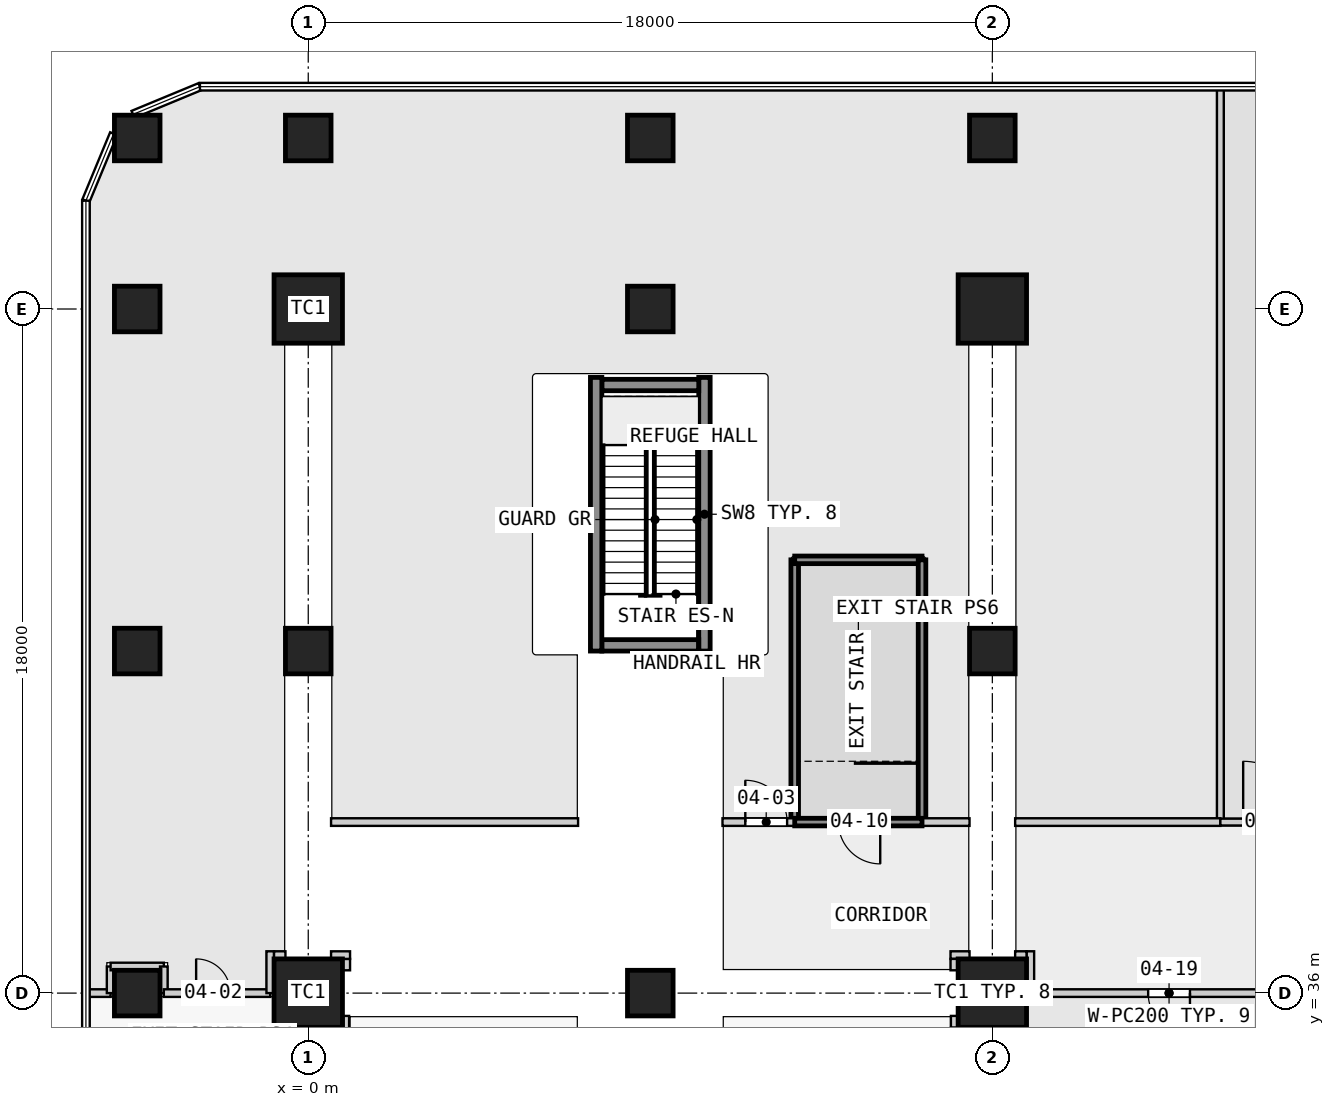
"""IFC4 building model, lengths in metres.
Left out: names, types, materials, properties, quantities, classifications, styles, units other than length and angle.
Written with IfcOpenShell. Run it as: python <this file> out.ifc"""

import sys

from ifc_helpers import new_model, si_unit, direction, frame, frame_2d, origin, origin_2d, place, context, subcontext, project, spatial, rectangle, extrude, element, fill, save


model = new_model("IFC4")
c1 = context("Model", 3, precision=1e-05, world=origin(), true_north=direction((0.0, 1.0)))
c2 = subcontext(c1, "Body", "Model", "MODEL_VIEW")
j1 = project(units=[si_unit("LENGTHUNIT", "METRE"), si_unit("PLANEANGLEUNIT", "RADIAN")], contexts=[c1])
p1 = place(None, origin())
s1 = spatial("IfcSite", under=j1, at=p1, CompositionType="ELEMENT")
p2 = place(p1, origin())
s2 = spatial("IfcBuilding", under=s1, at=p2, CompositionType="ELEMENT")
p3 = place(p2, frame((0.0, 0.0, 21.8)))
s3 = spatial("IfcBuildingStorey", under=s2, at=p3, CompositionType="ELEMENT", Elevation=21.8)
for number, where, z_axis, x_axis in (
    (1, (-4.5, 36.0, 0.0), (0.0, 0.0, 1.0), (1.0, 0.0, 0.0)),
    (2, (-4.5, 45.0, 0.0), (0.0, 0.0, 1.0), (1.0, 0.0, 0.0)),
    (3, (-4.5, 54.0, 0.0), (0.0, 0.0, 1.0), (1.0, 0.0, 0.0)),
    (4, (-4.5, 58.5, 0.0), (0.0, 0.0, 1.0), (1.0, 0.0, 0.0)),
):
    element("IfcColumn", number, at=place(p3, frame(where, z_axis=z_axis, x_axis=x_axis)), inside=s3, PredefinedType="COLUMN", context=c2, shape_type="SweptSolid", body=[
        extrude(rectangle(XDim=1.2, YDim=1.2, at=origin_2d()), origin(), (0.0, 0.0, 1.0), 5.0),
    ])
p4 = place(p3, frame((0.0, 36.0, 0.0), z_axis=(0.0, 0.0, 1.0), x_axis=(1.0, 0.0, 0.0)))
e5 = element("IfcColumn", 5, at=p4, inside=s3, PredefinedType="COLUMN", context=c2, shape_type="SweptSolid", body=[
    extrude(rectangle(XDim=1.8, YDim=1.8, at=origin_2d()), origin(), (0.0, 0.0, 1.0), 5.0),
])
p5 = place(p3, frame((0.0, 45.0, 0.0), z_axis=(0.0, 0.0, 1.0), x_axis=(1.0, 0.0, 0.0)))
e6 = element("IfcColumn", 6, at=p5, inside=s3, PredefinedType="COLUMN", context=c2, shape_type="SweptSolid", body=[
    extrude(rectangle(XDim=1.2, YDim=1.2, at=origin_2d()), origin(), (0.0, 0.0, 1.0), 5.0),
])
p6 = place(p3, frame((0.0, 54.0, 0.0), z_axis=(0.0, 0.0, 1.0), x_axis=(1.0, 0.0, 0.0)))
e7 = element("IfcColumn", 7, at=p6, inside=s3, PredefinedType="COLUMN", context=c2, shape_type="SweptSolid", body=[
    extrude(rectangle(XDim=1.8, YDim=1.8, at=origin_2d()), origin(), (0.0, 0.0, 1.0), 5.0),
])
for number, where, z_axis, x_axis in (
    (8, (0.0, 58.5, 0.0), (0.0, 0.0, 1.0), (1.0, 0.0, 0.0)),
    (9, (9.0, 36.0, 0.0), (0.0, 0.0, 1.0), (1.0, 0.0, 0.0)),
    (10, (9.0, 54.0, 0.0), (0.0, 0.0, 1.0), (1.0, 0.0, 0.0)),
    (11, (9.0, 58.5, 0.0), (0.0, 0.0, 1.0), (1.0, 0.0, 0.0)),
):
    element("IfcColumn", number, at=place(p3, frame(where, z_axis=z_axis, x_axis=x_axis)), inside=s3, PredefinedType="COLUMN", context=c2, shape_type="SweptSolid", body=[
        extrude(rectangle(XDim=1.2, YDim=1.2, at=origin_2d()), origin(), (0.0, 0.0, 1.0), 5.0),
    ])
p7 = place(p3, frame((18.0, 36.0, 0.0), z_axis=(0.0, 0.0, 1.0), x_axis=(1.0, 0.0, 0.0)))
e12 = element("IfcColumn", 12, at=p7, inside=s3, PredefinedType="COLUMN", context=c2, shape_type="SweptSolid", body=[
    extrude(rectangle(XDim=1.8, YDim=1.8, at=origin_2d()), origin(), (0.0, 0.0, 1.0), 5.0),
])
p8 = place(p3, frame((18.0, 45.0, 0.0), z_axis=(0.0, 0.0, 1.0), x_axis=(1.0, 0.0, 0.0)))
e13 = element("IfcColumn", 13, at=p8, inside=s3, PredefinedType="COLUMN", context=c2, shape_type="SweptSolid", body=[
    extrude(rectangle(XDim=1.2, YDim=1.2, at=origin_2d()), origin(), (0.0, 0.0, 1.0), 5.0),
])
p9 = place(p3, frame((18.0, 54.0, 0.0), z_axis=(0.0, 0.0, 1.0), x_axis=(1.0, 0.0, 0.0)))
e14 = element("IfcColumn", 14, at=p9, inside=s3, PredefinedType="COLUMN", context=c2, shape_type="SweptSolid", body=[
    extrude(rectangle(XDim=1.8, YDim=1.8, at=origin_2d()), origin(), (0.0, 0.0, 1.0), 5.0),
])
p10 = place(p3, frame((18.0, 58.5, 0.0), z_axis=(0.0, 0.0, 1.0), x_axis=(1.0, 0.0, 0.0)))
e15 = element("IfcColumn", 15, at=p10, inside=s3, PredefinedType="COLUMN", context=c2, shape_type="SweptSolid", body=[
    extrude(rectangle(XDim=1.2, YDim=1.2, at=origin_2d()), origin(), (0.0, 0.0, 1.0), 5.0),
])
for number, where, z_axis, x_axis in (
    (16, (7.725, 45.15, 0.0), (0.0, 0.0, 1.0), (1.0, 0.0, 0.0)),
    (17, (7.725, 52.0, 0.0), (0.0, 0.0, 1.0), (1.0, 0.0, 0.0)),
):
    element("IfcWall", number, at=place(p3, frame(where, z_axis=z_axis, x_axis=x_axis)), inside=s3, PredefinedType="SHEAR", context=c2, shape_type="SweptSolid", body=[
        extrude(rectangle(XDim=2.55, YDim=0.3, at=frame_2d((1.275, 0.0))), origin(), (0.0, 0.0, 1.0), 5.0),
    ])
for number, where, z_axis, x_axis in (
    (18, (7.575, 45.0, 0.0), (0.0, 0.0, 1.0), (0.0, 1.0, 0.0)),
    (19, (10.425, 45.0, 0.0), (0.0, 0.0, 1.0), (0.0, 1.0, 0.0)),
):
    element("IfcWall", number, at=place(p3, frame(where, z_axis=z_axis, x_axis=x_axis)), inside=s3, PredefinedType="SHEAR", context=c2, shape_type="SweptSolid", body=[
        extrude(rectangle(XDim=7.2, YDim=0.3, at=frame_2d((3.6, 0.0))), origin(), (0.0, 0.0, 1.0), 5.0),
    ])
p11 = place(p3, frame((24.0, 59.85, 0.0), z_axis=(0.0, 0.0, 1.0), x_axis=(0.0, -1.0, 0.0)))
e20 = element("IfcWall", 20, at=p11, inside=s3, PredefinedType="PARTITIONING", context=c2, shape_type="SweptSolid", body=[
    extrude(rectangle(XDim=19.35, YDim=0.18, at=frame_2d((9.675, 0.0))), origin(), (0.0, 0.0, 1.0), 4.5),
])
p12 = place(p3, frame((12.8, 40.5, 0.0), z_axis=(0.0, 0.0, 1.0), x_axis=(0.0, 1.0, 0.0)))
e21 = element("IfcWall", 21, at=p12, inside=s3, PredefinedType="PARTITIONING", context=c2, shape_type="SweptSolid", body=[
    extrude(rectangle(XDim=6.9, YDim=0.2, at=frame_2d((3.45, 0.0))), origin(), (0.0, 0.0, 1.0), 4.5),
])
p13 = place(p3, frame((12.8, 47.4, 0.0), z_axis=(0.0, 0.0, 1.0), x_axis=(1.0, 0.0, 0.0)))
e22 = element("IfcWall", 22, at=p13, inside=s3, PredefinedType="PARTITIONING", context=c2, shape_type="SweptSolid", body=[
    extrude(rectangle(XDim=3.35, YDim=0.2, at=frame_2d((1.675, 0.0))), origin(), (0.0, 0.0, 1.0), 4.5),
])
p14 = place(p3, frame((16.15, 47.4, 0.0), z_axis=(0.0, 0.0, 1.0), x_axis=(0.0, -1.0, 0.0)))
e23 = element("IfcWall", 23, at=p14, inside=s3, PredefinedType="PARTITIONING", context=c2, shape_type="SweptSolid", body=[
    extrude(rectangle(XDim=6.9, YDim=0.2, at=frame_2d((3.45, 0.0))), origin(), (0.0, 0.0, 1.0), 4.5),
])
p15 = place(p3, frame((26.3, 36.0, 0.0), z_axis=(0.0, 0.0, 1.0), x_axis=(-1.0, 0.0, 0.0)))
e24 = element("IfcWall", 24, at=p15, inside=s3, PredefinedType="PARTITIONING", context=c2, shape_type="SweptSolid", body=[
    extrude(rectangle(XDim=7.3, YDim=0.2, at=frame_2d((3.65, 0.0))), origin(), (0.0, 0.0, 1.0), 4.5),
])
p16 = place(p15, frame((3.1, 0.0, 0.0)))
e25 = element("IfcOpeningElement", 25, at=p16, cuts=e24, PredefinedType="OPENING", context=c2, shape_type="SweptSolid", body=[
    extrude(rectangle(XDim=1.1, YDim=2.1, at=frame_2d((0.55, 1.05))), frame((0.0, 0.11, 0.0), z_axis=(0.0, -1.0, 0.0), x_axis=(1.0, 0.0, 0.0)), (0.0, 0.0, 1.0), 0.22),
])
p17 = place(p3, frame((19.0, 36.0, 0.0), z_axis=(0.0, 0.0, 1.0), x_axis=(0.0, 1.0, 0.0)))
e26 = element("IfcWall", 26, at=p17, inside=s3, PredefinedType="PARTITIONING", context=c2, shape_type="SweptSolid", body=[
    extrude(rectangle(XDim=1.1, YDim=0.2, at=frame_2d((0.55, 0.0))), origin(), (0.0, 0.0, 1.0), 4.5),
])
p18 = place(p3, frame((18.9, 37.0, 0.0), z_axis=(0.0, 0.0, 1.0), x_axis=(-1.0, 0.0, 0.0)))
e27 = element("IfcWall", 27, at=p18, inside=s3, PredefinedType="PARTITIONING", context=c2, shape_type="SweptSolid", body=[
    extrude(rectangle(XDim=0.3, YDim=0.2, at=frame_2d((0.15, 0.0))), origin(), (0.0, 0.0, 1.0), 4.5),
])
p19 = place(p3, frame((17.4, 37.0, 0.0), z_axis=(0.0, 0.0, 1.0), x_axis=(-1.0, 0.0, 0.0)))
e28 = element("IfcWall", 28, at=p19, inside=s3, PredefinedType="PARTITIONING", context=c2, shape_type="SweptSolid", body=[
    extrude(rectangle(XDim=0.5, YDim=0.2, at=frame_2d((0.25, 0.0))), origin(), (0.0, 0.0, 1.0), 4.5),
])
p20 = place(p3, frame((17.0, 36.9, 0.0), z_axis=(0.0, 0.0, 1.0), x_axis=(0.0, -1.0, 0.0)))
e29 = element("IfcWall", 29, at=p20, inside=s3, PredefinedType="PARTITIONING", context=c2, shape_type="SweptSolid", body=[
    extrude(rectangle(XDim=0.3, YDim=0.2, at=frame_2d((0.15, 0.0))), origin(), (0.0, 0.0, 1.0), 4.5),
])
p21 = place(p3, frame((10.9, 40.5, 0.0), z_axis=(0.0, 0.0, 1.0), x_axis=(1.0, 0.0, 0.0)))
e30 = element("IfcWall", 30, at=p21, inside=s3, PredefinedType="PARTITIONING", context=c2, shape_type="SweptSolid", body=[
    extrude(rectangle(XDim=1.9, YDim=0.2, at=frame_2d((0.95, 0.0))), origin(), (0.0, 0.0, 1.0), 4.5),
])
p22 = place(p21, frame((0.6, 0.0, 0.0)))
e31 = element("IfcOpeningElement", 31, at=p22, cuts=e30, PredefinedType="OPENING", context=c2, shape_type="SweptSolid", body=[
    extrude(rectangle(XDim=1.1, YDim=2.1, at=frame_2d((0.55, 1.05))), frame((0.0, 0.11, 0.0), z_axis=(0.0, -1.0, 0.0), x_axis=(1.0, 0.0, 0.0)), (0.0, 0.0, 1.0), 0.22),
])
p23 = place(p3, frame((0.6, 40.5, 0.0), z_axis=(0.0, 0.0, 1.0), x_axis=(1.0, 0.0, 0.0)))
e32 = element("IfcWall", 32, at=p23, inside=s3, PredefinedType="PARTITIONING", context=c2, shape_type="SweptSolid", body=[
    extrude(rectangle(XDim=6.5, YDim=0.2, at=frame_2d((3.25, 0.0))), origin(), (0.0, 0.0, 1.0), 4.5),
])
p24 = place(p3, frame((17.0, 35.4, 0.0), z_axis=(0.0, 0.0, 1.0), x_axis=(0.0, -1.0, 0.0)))
e33 = element("IfcWall", 33, at=p24, inside=s3, PredefinedType="PARTITIONING", context=c2, shape_type="SweptSolid", body=[
    extrude(rectangle(XDim=0.31, YDim=0.18, at=frame_2d((0.155, 0.0))), origin(), (0.0, 0.0, 1.0), 4.5),
])
p25 = place(p3, frame((1.0, 35.4, 0.0), z_axis=(0.0, 0.0, 1.0), x_axis=(0.0, -1.0, 0.0)))
e34 = element("IfcWall", 34, at=p25, inside=s3, PredefinedType="PARTITIONING", context=c2, shape_type="SweptSolid", body=[
    extrude(rectangle(XDim=0.4, YDim=0.15, at=frame_2d((0.2, 0.0))), origin(), (0.0, 0.0, 1.0), 4.5),
])
p26 = place(p3, frame((-5.85, 36.0, 0.0), z_axis=(0.0, 0.0, 1.0), x_axis=(1.0, 0.0, 0.0)))
e35 = element("IfcWall", 35, at=p26, inside=s3, PredefinedType="PARTITIONING", context=c2, shape_type="SweptSolid", body=[
    extrude(rectangle(XDim=0.65, YDim=0.2, at=frame_2d((0.325, 0.0))), origin(), (0.0, 0.0, 1.0), 4.5),
])
p27 = place(p3, frame((-5.2, 36.0, 0.0), z_axis=(0.0, 0.0, 1.0), x_axis=(0.0, 1.0, 0.0)))
e36 = element("IfcWall", 36, at=p27, inside=s3, PredefinedType="PARTITIONING", context=c2, shape_type="SweptSolid", body=[
    extrude(rectangle(XDim=0.7, YDim=0.2, at=frame_2d((0.35, 0.0))), origin(), (0.0, 0.0, 1.0), 4.5),
])
p28 = place(p3, frame((-5.2, 36.7, 0.0), z_axis=(0.0, 0.0, 1.0), x_axis=(1.0, 0.0, 0.0)))
e37 = element("IfcWall", 37, at=p28, inside=s3, PredefinedType="PARTITIONING", context=c2, shape_type="SweptSolid", body=[
    extrude(rectangle(XDim=1.4, YDim=0.2, at=frame_2d((0.7, 0.0))), origin(), (0.0, 0.0, 1.0), 4.5),
])
p29 = place(p3, frame((-3.8, 36.7, 0.0), z_axis=(0.0, 0.0, 1.0), x_axis=(0.0, -1.0, 0.0)))
e38 = element("IfcWall", 38, at=p29, inside=s3, PredefinedType="PARTITIONING", context=c2, shape_type="SweptSolid", body=[
    extrude(rectangle(XDim=0.7, YDim=0.2, at=frame_2d((0.35, 0.0))), origin(), (0.0, 0.0, 1.0), 4.5),
])
p30 = place(p3, frame((-3.8, 36.0, 0.0), z_axis=(0.0, 0.0, 1.0), x_axis=(1.0, 0.0, 0.0)))
e39 = element("IfcWall", 39, at=p30, inside=s3, PredefinedType="PARTITIONING", context=c2, shape_type="SweptSolid", body=[
    extrude(rectangle(XDim=2.8, YDim=0.2, at=frame_2d((1.4, 0.0))), origin(), (0.0, 0.0, 1.0), 4.5),
])
p31 = place(p30, frame((0.85, 0.0, 0.0)))
e40 = element("IfcOpeningElement", 40, at=p31, cuts=e39, PredefinedType="OPENING", context=c2, shape_type="SweptSolid", body=[
    extrude(rectangle(XDim=0.9, YDim=2.1, at=frame_2d((0.45, 1.05))), frame((0.0, 0.11, 0.0), z_axis=(0.0, -1.0, 0.0), x_axis=(1.0, 0.0, 0.0)), (0.0, 0.0, 1.0), 0.22),
])
p32 = place(p3, frame((-1.0, 36.0, 0.0), z_axis=(0.0, 0.0, 1.0), x_axis=(0.0, 1.0, 0.0)))
e41 = element("IfcWall", 41, at=p32, inside=s3, PredefinedType="PARTITIONING", context=c2, shape_type="SweptSolid", body=[
    extrude(rectangle(XDim=1.1, YDim=0.2, at=frame_2d((0.55, 0.0))), origin(), (0.0, 0.0, 1.0), 4.5),
])
p33 = place(p3, frame((-0.9, 37.0, 0.0), z_axis=(0.0, 0.0, 1.0), x_axis=(1.0, 0.0, 0.0)))
e42 = element("IfcWall", 42, at=p33, inside=s3, PredefinedType="PARTITIONING", context=c2, shape_type="SweptSolid", body=[
    extrude(rectangle(XDim=0.3, YDim=0.2, at=frame_2d((0.15, 0.0))), origin(), (0.0, 0.0, 1.0), 4.5),
])
p34 = place(p3, frame((18.6, 40.5, 0.0), z_axis=(0.0, 0.0, 1.0), x_axis=(1.0, 0.0, 0.0)))
e43 = element("IfcWall", 43, at=p34, inside=s3, PredefinedType="PARTITIONING", context=c2, shape_type="SweptSolid", body=[
    extrude(rectangle(XDim=5.4, YDim=0.2, at=frame_2d((2.7, 0.0))), origin(), (0.0, 0.0, 1.0), 4.5),
])
p35 = place(p3, frame((16.15, 40.5, 0.0), z_axis=(0.0, 0.0, 1.0), x_axis=(1.0, 0.0, 0.0)))
e44 = element("IfcWall", 44, at=p35, inside=s3, PredefinedType="PARTITIONING", context=c2, shape_type="SweptSolid", body=[
    extrude(rectangle(XDim=1.25, YDim=0.2, at=frame_2d((0.625, 0.0))), origin(), (0.0, 0.0, 1.0), 4.5),
])
p36 = place(p3, frame((16.15, 40.5, 0.0), z_axis=(0.0, 0.0, 1.0), x_axis=(-1.0, 0.0, 0.0)))
e45 = element("IfcWall", 45, at=p36, inside=s3, PredefinedType="PARTITIONING", context=c2, shape_type="SweptSolid", body=[
    extrude(rectangle(XDim=3.35, YDim=0.2, at=frame_2d((1.675, 0.0))), origin(), (0.0, 0.0, 1.0), 4.5),
])
p37 = place(p36, frame((1.1, 0.0, 0.0)))
e46 = element("IfcOpeningElement", 46, at=p37, cuts=e45, PredefinedType="OPENING", context=c2, shape_type="SweptSolid", body=[
    extrude(rectangle(XDim=1.1, YDim=2.1, at=frame_2d((0.55, 1.05))), frame((0.0, 0.11, 0.0), z_axis=(0.0, -1.0, 0.0), x_axis=(1.0, 0.0, 0.0)), (0.0, 0.0, 1.0), 0.22),
])
p38 = place(p3, frame((24.0, 40.5, 0.0), z_axis=(0.0, 0.0, 1.0), x_axis=(1.0, 0.0, 0.0)))
e47 = element("IfcWall", 47, at=p38, inside=s3, PredefinedType="PARTITIONING", context=c2, shape_type="SweptSolid", body=[
    extrude(rectangle(XDim=3.0, YDim=0.18, at=frame_2d((1.5, 0.0))), origin(), (0.0, 0.0, 1.0), 4.5),
])
p39 = place(p38, frame((0.6, 0.0, 0.0)))
e48 = element("IfcOpeningElement", 48, at=p39, cuts=e47, PredefinedType="OPENING", context=c2, shape_type="SweptSolid", body=[
    extrude(rectangle(XDim=1.6, YDim=2.4, at=frame_2d((0.8, 1.2))), frame((0.0, 0.1, 0.0), z_axis=(0.0, -1.0, 0.0), x_axis=(1.0, 0.0, 0.0)), (0.0, 0.0, 1.0), 0.2),
])
p40 = place(p3, frame((1.0, 36.6, 0.0), z_axis=(0.0, 0.0, 1.0), x_axis=(0.0, 1.0, 0.0)))
e49 = element("IfcWall", 49, at=p40, inside=s3, PredefinedType="PARTITIONING", context=c2, shape_type="SweptSolid", body=[
    extrude(rectangle(XDim=0.3, YDim=0.2, at=frame_2d((0.15, 0.0))), origin(), (0.0, 0.0, 1.0), 4.5),
])
p41 = place(p3, frame((1.1, 37.0, 0.0), z_axis=(0.0, 0.0, 1.0), x_axis=(-1.0, 0.0, 0.0)))
e50 = element("IfcWall", 50, at=p41, inside=s3, PredefinedType="PARTITIONING", context=c2, shape_type="SweptSolid", body=[
    extrude(rectangle(XDim=0.5, YDim=0.2, at=frame_2d((0.25, 0.0))), origin(), (0.0, 0.0, 1.0), 4.5),
])
p42 = place(p31, origin())
e51 = element("IfcDoor", 51, at=p42, inside=s3, OperationType="SINGLE_SWING_LEFT", PredefinedType="DOOR", context=c2, shape_type="SweptSolid", body=[
    extrude(rectangle(XDim=0.9, YDim=2.1, at=frame_2d((0.45, 1.05))), frame((0.0, 0.025, 0.0), z_axis=(0.0, -1.0, 0.0), x_axis=(1.0, 0.0, 0.0)), (0.0, 0.0, 1.0), 0.05),
])
fill(e40, e51)
p43 = place(p22, origin())
e52 = element("IfcDoor", 52, at=p43, inside=s3, OperationType="SINGLE_SWING_LEFT", PredefinedType="DOOR", context=c2, shape_type="SweptSolid", body=[
    extrude(rectangle(XDim=1.1, YDim=2.1, at=frame_2d((0.55, 1.05))), frame((0.0, 0.025, 0.0), z_axis=(0.0, -1.0, 0.0), x_axis=(1.0, 0.0, 0.0)), (0.0, 0.0, 1.0), 0.05),
])
fill(e31, e52)
p44 = place(p37, origin())
e53 = element("IfcDoor", 53, at=p44, inside=s3, OperationType="SINGLE_SWING_LEFT", PredefinedType="DOOR", context=c2, shape_type="SweptSolid", body=[
    extrude(rectangle(XDim=1.1, YDim=2.1, at=frame_2d((0.55, 1.05))), frame((0.0, 0.025, 0.0), z_axis=(0.0, -1.0, 0.0), x_axis=(1.0, 0.0, 0.0)), (0.0, 0.0, 1.0), 0.05),
])
fill(e46, e53)
p45 = place(p16, origin())
e54 = element("IfcDoor", 54, at=p45, inside=s3, OperationType="SINGLE_SWING_LEFT", PredefinedType="DOOR", context=c2, shape_type="SweptSolid", body=[
    extrude(rectangle(XDim=1.1, YDim=2.1, at=frame_2d((0.55, 1.05))), frame((0.0, 0.025, 0.0), z_axis=(0.0, -1.0, 0.0), x_axis=(1.0, 0.0, 0.0)), (0.0, 0.0, 1.0), 0.05),
])
fill(e25, e54)
p46 = place(p39, origin())
e55 = element("IfcDoor", 55, at=p46, inside=s3, OperationType="SINGLE_SWING_LEFT", PredefinedType="DOOR", context=c2, shape_type="SweptSolid", body=[
    extrude(rectangle(XDim=1.6, YDim=2.4, at=frame_2d((0.8, 1.2))), frame((0.0, 0.025, 0.0), z_axis=(0.0, -1.0, 0.0), x_axis=(1.0, 0.0, 0.0)), (0.0, 0.0, 1.0), 0.05),
])
fill(e48, e55)
save(model, sys.argv[1])
